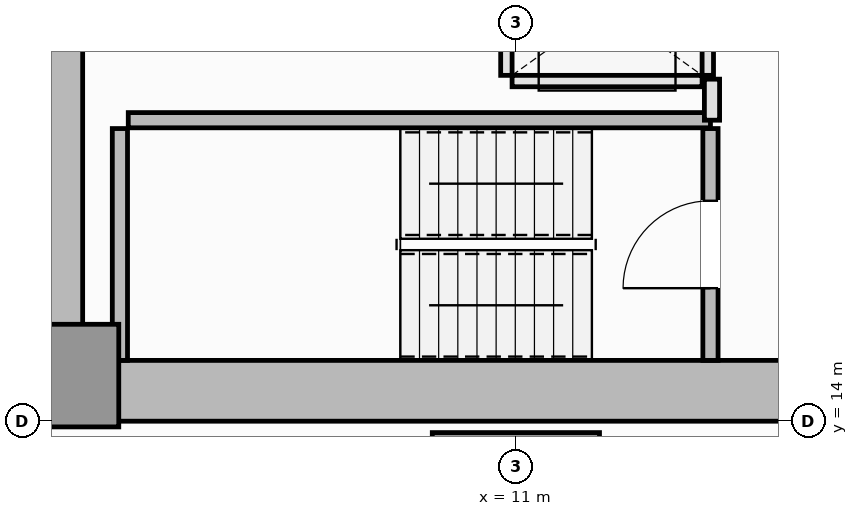
"""IFC4 building model, lengths in metres.
Left out: names, types, materials, properties, quantities, classifications, styles, units other than length and angle.
Written with IfcOpenShell. Run it as: python <this file> out.ifc"""

import sys

from ifc_helpers import new_model, si_unit, direction, frame, frame_2d, origin, origin_2d, place, context, subcontext, project, spatial, rectangle, extrude, element, fill, save


model = new_model("IFC4")
c1 = context("Model", 3, precision=1e-05, world=origin(), true_north=direction((0.0, 1.0)))
c2 = subcontext(c1, "Body", "Model", "MODEL_VIEW")
j1 = project(units=[si_unit("LENGTHUNIT", "METRE"), si_unit("PLANEANGLEUNIT", "RADIAN")], contexts=[c1])
p1 = place(None, origin())
s1 = spatial("IfcSite", under=j1, at=p1, CompositionType="ELEMENT")
p2 = place(p1, origin())
s2 = spatial("IfcBuilding", under=s1, at=p2, CompositionType="ELEMENT")
p3 = place(p2, frame((0.0, 0.0, 46.9)))
s3 = spatial("IfcBuildingStorey", under=s2, at=p3, CompositionType="ELEMENT", Elevation=46.9)
p4 = place(p3, frame((4.5, 14.4, 0.0), z_axis=(0.0, 0.0, 1.0), x_axis=(1.0, 0.0, 0.0)))
e1 = element("IfcWall", 1, at=p4, inside=s3, PredefinedType="SHEAR", context=c2, shape_type="SweptSolid", body=[
    extrude(rectangle(XDim=13.5, YDim=0.8, at=frame_2d((6.75, 0.0))), origin(), (0.0, 0.0, 1.0), 3.55),
])
p5 = place(p3, frame((4.9, 14.8, 0.0), z_axis=(0.0, 0.0, 1.0), x_axis=(0.0, 1.0, 0.0)))
e2 = element("IfcWall", 2, at=p5, inside=s3, PredefinedType="SHEAR", context=c2, shape_type="SweptSolid", body=[
    extrude(rectangle(XDim=20.9, YDim=0.8, at=frame_2d((10.45, 0.0))), origin(), (0.0, 0.0, 1.0), 3.55),
])
p6 = place(p3, frame((5.1, 14.6, 0.0), z_axis=(0.0, 0.0, 1.0), x_axis=(1.0, 0.0, 0.0)))
e3 = element("IfcColumn", 3, at=p6, inside=s3, PredefinedType="PILASTER", context=c2, shape_type="SweptSolid", body=[
    extrude(rectangle(XDim=1.35, YDim=1.35, at=origin_2d()), origin(), (0.0, 0.0, 1.0), 3.55),
])
p7 = place(p3, frame((11.0, 12.75, 0.0), z_axis=(0.0, 0.0, 1.0), x_axis=(1.0, 0.0, 0.0)))
e4 = element("IfcColumn", 4, at=p7, inside=s3, PredefinedType="COLUMN", context=c2, shape_type="SweptSolid", body=[
    extrude(rectangle(XDim=2.2, YDim=2.2, at=origin_2d()), origin(), (0.0, 0.0, 1.0), 3.55),
])
p8 = place(p3, frame((5.79, 14.8, 0.0), z_axis=(0.0, 0.0, 1.0), x_axis=(0.0, 1.0, 0.0)))
e5 = element("IfcWall", 5, at=p8, inside=s3, PredefinedType="SOLIDWALL", context=c2, shape_type="SweptSolid", body=[
    extrude(rectangle(XDim=3.05, YDim=0.2, at=frame_2d((1.525, 0.0))), origin(), (0.0, 0.0, 1.0), 3.55),
])
p9 = place(p3, frame((5.9, 17.96, 0.0), z_axis=(0.0, 0.0, 1.0), x_axis=(1.0, 0.0, 0.0)))
e6 = element("IfcWall", 6, at=p9, inside=s3, PredefinedType="SOLIDWALL", context=c2, shape_type="SweptSolid", body=[
    extrude(rectangle(XDim=7.66, YDim=0.2, at=frame_2d((3.83, 0.0))), origin(), (0.0, 0.0, 1.0), 3.55),
])
p10 = place(p3, frame((13.56, 14.8, 0.0), z_axis=(0.0, 0.0, 1.0), x_axis=(0.0, 1.0, 0.0)))
e7 = element("IfcWall", 7, at=p10, inside=s3, PredefinedType="SOLIDWALL", context=c2, shape_type="SweptSolid", body=[
    extrude(rectangle(XDim=3.05, YDim=0.2, at=frame_2d((1.525, 0.0))), origin(), (0.0, 0.0, 1.0), 3.55),
])
p11 = place(p10, frame((0.95, 0.0, 0.0)))
e8 = element("IfcOpeningElement", 8, at=p11, cuts=e7, PredefinedType="OPENING", context=c2, shape_type="SweptSolid", body=[
    extrude(rectangle(XDim=1.15, YDim=2.15, at=frame_2d((0.575, 1.075))), frame((0.0, 0.11, 0.0), z_axis=(0.0, -1.0, 0.0), x_axis=(1.0, 0.0, 0.0)), (0.0, 0.0, 1.0), 0.22),
])
p12 = place(p3, frame((10.95, 18.475, 0.0), z_axis=(0.0, 0.0, 1.0), x_axis=(1.0, 0.0, 0.0)))
e9 = element("IfcWall", 9, at=p12, inside=s3, PredefinedType="PARTITIONING", context=c2, shape_type="SweptSolid", body=[
    extrude(rectangle(XDim=2.5, YDim=0.15, at=frame_2d((1.25, 0.0))), origin(), (0.0, 0.0, 1.0), 3.37),
])
p13 = place(p3, frame((10.875, 18.55, 0.0), z_axis=(0.0, 0.0, 1.0), x_axis=(0.0, 1.0, 0.0)))
e10 = element("IfcWall", 10, at=p13, inside=s3, PredefinedType="PARTITIONING", context=c2, shape_type="SweptSolid", body=[
    extrude(rectangle(XDim=1.8, YDim=0.15, at=frame_2d((0.9, 0.0))), origin(), (0.0, 0.0, 1.0), 3.37),
])
p14 = place(p3, frame((13.525, 18.55, 0.0), z_axis=(0.0, 0.0, 1.0), x_axis=(0.0, 1.0, 0.0)))
e11 = element("IfcWall", 11, at=p14, inside=s3, PredefinedType="PARTITIONING", context=c2, shape_type="SweptSolid", body=[
    extrude(rectangle(XDim=1.8, YDim=0.15, at=frame_2d((0.9, 0.0))), origin(), (0.0, 0.0, 1.0), 3.37),
])
p15 = place(p14, frame((0.35, 0.0, 0.0)))
e12 = element("IfcOpeningElement", 12, at=p15, cuts=e11, PredefinedType="OPENING", context=c2, shape_type="SweptSolid", body=[
    extrude(rectangle(XDim=1.1, YDim=2.2, at=frame_2d((0.55, 1.1))), frame((0.0, 0.085, 0.0), z_axis=(0.0, -1.0, 0.0), x_axis=(1.0, 0.0, 0.0)), (0.0, 0.0, 1.0), 0.17),
])
p16 = place(p3, frame((13.58, 17.96, 0.0), z_axis=(0.0, 0.0, 1.0), x_axis=(0.0, 1.0, 0.0)))
e13 = element("IfcWall", 13, at=p16, inside=s3, PredefinedType="PARTITIONING", context=c2, shape_type="SweptSolid", body=[
    extrude(rectangle(XDim=0.54, YDim=0.2, at=frame_2d((0.27, 0.0))), origin(), (0.0, 0.0, 1.0), 3.37),
])
p17 = place(p11, origin())
e14 = element("IfcDoor", 14, at=p17, inside=s3, OperationType="SINGLE_SWING_LEFT", PredefinedType="DOOR", context=c2, shape_type="SweptSolid", body=[
    extrude(rectangle(XDim=1.15, YDim=2.15, at=frame_2d((0.575, 1.075))), frame((0.0, 0.025, 0.0), z_axis=(0.0, -1.0, 0.0), x_axis=(1.0, 0.0, 0.0)), (0.0, 0.0, 1.0), 0.05),
])
fill(e8, e14)
save(model, sys.argv[1])
